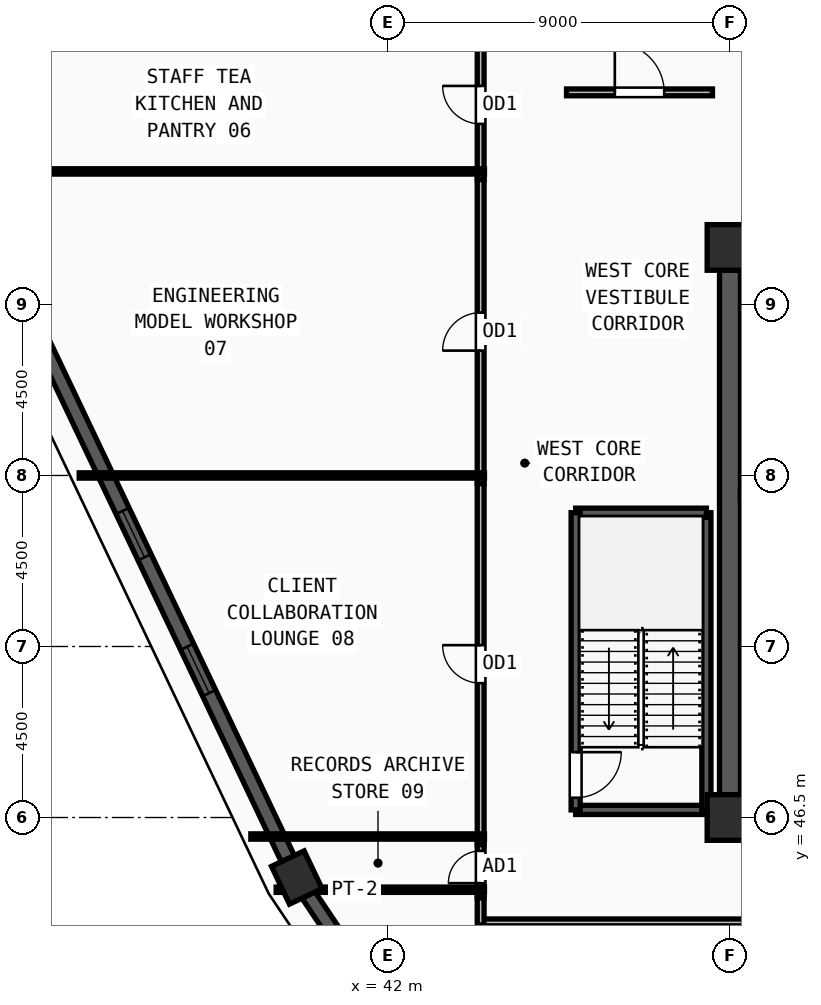
"""IFC4 building model, lengths in metres.
Left out: names, types, materials, properties, quantities, classifications, styles, units other than length and angle.
Written with IfcOpenShell. Run it as: python <this file> out.ifc"""

import sys

from ifc_helpers import new_model, si_unit, direction, frame, frame_2d, origin, origin_2d, place, context, subcontext, project, spatial, rectangle, extrude, source, transform, mapped, element, fill, save


model = new_model("IFC4")
c1 = context("Model", 3, precision=1e-05, world=origin(), true_north=direction((0.0, 1.0)))
c2 = subcontext(c1, "Body", "Model", "MODEL_VIEW")
j1 = project(units=[si_unit("LENGTHUNIT", "METRE"), si_unit("PLANEANGLEUNIT", "RADIAN")], contexts=[c1])
p1 = place(None, origin())
s1 = spatial("IfcSite", under=j1, at=p1, CompositionType="ELEMENT")
p2 = place(p1, origin())
s2 = spatial("IfcBuilding", under=s1, at=p2, CompositionType="ELEMENT")
p3 = place(p2, frame((0.0, 0.0, 297.75)))
s3 = spatial("IfcBuildingStorey", under=s2, at=p3, CompositionType="ELEMENT", Elevation=297.75)
m1 = source(origin(), c2, "Body", "SweptSolid", [
    extrude(rectangle(XDim=1.2, YDim=1.2, at=origin_2d()), origin(), (0.0, 0.0, 1.0), 3.75),
])
for number, where, z_axis, x_axis in (
    (1, (51.0, 46.5, 0.0), (0.0, 0.0, 1.0), (1.0, 0.0, 0.0)),
    (2, (51.0, 61.5, 0.0), (0.0, 0.0, 1.0), (1.0, 0.0, 0.0)),
):
    element("IfcColumn", number, at=place(p3, frame(where, z_axis=z_axis, x_axis=x_axis)), inside=s3, PredefinedType="COLUMN", context=c2, shape_type="MappedRepresentation", body=[
        mapped(m1, transform((0.0, 0.0, 0.0), x_axis=(1.0, 0.0, 0.0), y_axis=(0.0, 1.0, 0.0), z_axis=(0.0, 0.0, 1.0), scale=1.0)),
    ])
m2 = source(origin(), c2, "Body", "SweptSolid", [
    extrude(rectangle(XDim=1.1, YDim=0.95, at=origin_2d()), origin(), (0.0, 0.0, 1.0), 3.75),
])
p4 = place(p3, frame((39.602, 44.921, 0.0), z_axis=(0.0, 0.0, 1.0), x_axis=(-0.429250430767, 0.903185511225, 0.0)))
e3 = element("IfcColumn", 3, at=p4, inside=s3, PredefinedType="COLUMN", context=c2, shape_type="MappedRepresentation", body=[
    mapped(m2, transform((0.0, 0.0, 0.0), x_axis=(1.0, 0.0, 0.0), y_axis=(0.0, 1.0, 0.0), z_axis=(0.0, 0.0, 1.0), scale=1.0)),
])
p5 = place(p3, frame((29.912, 65.305, 0.0), z_axis=(0.0, 0.0, 1.0), x_axis=(0.429331226257, -0.903147107708, 0.0)))
e4 = element("IfcWall", 4, at=p5, inside=s3, PredefinedType="SOLIDWALL", context=c2, shape_type="SweptSolid", body=[
    extrude(rectangle(XDim=22.03, YDim=0.38, at=frame_2d((11.015, 0.0))), origin(), (0.0, 0.0, 1.0), 3.57),
])
m3 = source(origin(), c2, "Body", "SweptSolid", [
    extrude(rectangle(XDim=1.35, YDim=1.85, at=frame_2d((0.675, 0.925))), frame((0.0, 0.2, 0.0), z_axis=(0.0, -1.0, 0.0), x_axis=(1.0, 0.0, 0.0)), (0.0, 0.0, 1.0), 0.4),
])
p6 = place(p5, frame((4.832, 0.0, 0.55)))
e5 = element("IfcOpeningElement", 5, at=p6, cuts=e4, PredefinedType="OPENING", context=c2, shape_type="MappedRepresentation", body=[
    mapped(m3, transform((0.0, 0.0, 0.0), x_axis=(1.0, 0.0, 0.0), y_axis=(0.0, 1.0, 0.0), z_axis=(0.0, 0.0, 1.0), scale=1.0)),
])
p7 = place(p5, frame((11.89, 0.0, 0.55)))
e6 = element("IfcOpeningElement", 6, at=p7, cuts=e4, PredefinedType="OPENING", context=c2, shape_type="MappedRepresentation", body=[
    mapped(m3, transform((0.0, 0.0, 0.0), x_axis=(1.0, 0.0, 0.0), y_axis=(0.0, 1.0, 0.0), z_axis=(0.0, 0.0, 1.0), scale=1.0)),
])
p8 = place(p5, frame((15.847, 0.0, 0.55)))
e7 = element("IfcOpeningElement", 7, at=p8, cuts=e4, PredefinedType="OPENING", context=c2, shape_type="MappedRepresentation", body=[
    mapped(m3, transform((0.0, 0.0, 0.0), x_axis=(1.0, 0.0, 0.0), y_axis=(0.0, 1.0, 0.0), z_axis=(0.0, 0.0, 1.0), scale=1.0)),
])
p9 = place(p3, frame((39.903, 44.472, 0.0), z_axis=(0.0, 0.0, 1.0), x_axis=(0.556589940211, -0.830787360554, 0.0)))
e8 = element("IfcWall", 8, at=p9, inside=s3, PredefinedType="SOLIDWALL", context=c2, shape_type="SweptSolid", body=[
    extrude(rectangle(XDim=26.693, YDim=0.38, at=frame_2d((13.346, 0.0))), origin(), (0.0, 0.0, 1.0), 3.57),
])
p10 = place(p9, frame((5.998, 0.0, 0.55)))
e9 = element("IfcOpeningElement", 9, at=p10, cuts=e8, PredefinedType="OPENING", context=c2, shape_type="MappedRepresentation", body=[
    mapped(m3, transform((0.0, 0.0, 0.0), x_axis=(1.0, 0.0, 0.0), y_axis=(0.0, 1.0, 0.0), z_axis=(0.0, 0.0, 1.0), scale=1.0)),
])
p11 = place(p9, frame((12.671, 0.0, 0.55)))
e10 = element("IfcOpeningElement", 10, at=p11, cuts=e8, PredefinedType="OPENING", context=c2, shape_type="MappedRepresentation", body=[
    mapped(m3, transform((0.0, 0.0, 0.0), x_axis=(1.0, 0.0, 0.0), y_axis=(0.0, 1.0, 0.0), z_axis=(0.0, 0.0, 1.0), scale=1.0)),
])
p12 = place(p9, frame((19.345, 0.0, 0.55)))
e11 = element("IfcOpeningElement", 11, at=p12, cuts=e8, PredefinedType="OPENING", context=c2, shape_type="MappedRepresentation", body=[
    mapped(m3, transform((0.0, 0.0, 0.0), x_axis=(1.0, 0.0, 0.0), y_axis=(0.0, 1.0, 0.0), z_axis=(0.0, 0.0, 1.0), scale=1.0)),
])
p13 = place(p3, frame((51.0, 47.1, 0.0), z_axis=(0.0, 0.0, 1.0), x_axis=(0.0, 1.0, 0.0)))
e12 = element("IfcWall", 12, at=p13, inside=s3, PredefinedType="SHEAR", context=c2, shape_type="SweptSolid", body=[
    extrude(rectangle(XDim=13.8, YDim=0.55, at=frame_2d((6.9, 0.0))), origin(), (0.0, 0.0, 1.0), 3.57),
])
p14 = place(p3, frame((46.94, 46.7, 0.0), z_axis=(0.0, 0.0, 1.0), x_axis=(1.0, 0.0, 0.0)))
e13 = element("IfcWall", 13, at=p14, inside=s3, PredefinedType="SOLIDWALL", context=c2, shape_type="SweptSolid", body=[
    extrude(rectangle(XDim=3.44, YDim=0.24, at=frame_2d((1.72, 0.0))), origin(), (0.0, 0.0, 1.0), 3.57),
])
p15 = place(p3, frame((50.38, 46.7, 0.0), z_axis=(0.0, 0.0, 1.0), x_axis=(0.0, 1.0, 0.0)))
e14 = element("IfcWall", 14, at=p15, inside=s3, PredefinedType="SOLIDWALL", context=c2, shape_type="SweptSolid", body=[
    extrude(rectangle(XDim=7.82, YDim=0.24, at=frame_2d((3.91, 0.0))), origin(), (0.0, 0.0, 1.0), 3.57),
])
p16 = place(p3, frame((50.38, 54.52, 0.0), z_axis=(0.0, 0.0, 1.0), x_axis=(-1.0, 0.0, 0.0)))
e15 = element("IfcWall", 15, at=p16, inside=s3, PredefinedType="SOLIDWALL", context=c2, shape_type="SweptSolid", body=[
    extrude(rectangle(XDim=3.44, YDim=0.24, at=frame_2d((1.72, 0.0))), origin(), (0.0, 0.0, 1.0), 3.57),
])
p17 = place(p3, frame((46.94, 54.52, 0.0), z_axis=(0.0, 0.0, 1.0), x_axis=(0.0, -1.0, 0.0)))
e16 = element("IfcWall", 16, at=p17, inside=s3, PredefinedType="SOLIDWALL", context=c2, shape_type="SweptSolid", body=[
    extrude(rectangle(XDim=7.82, YDim=0.24, at=frame_2d((3.91, 0.0))), origin(), (0.0, 0.0, 1.0), 3.57),
])
m4 = source(origin(), c2, "Body", "SweptSolid", [
    extrude(rectangle(XDim=1.2, YDim=2.2, at=frame_2d((0.6, 1.1))), frame((0.0, 0.13, 0.0), z_axis=(0.0, -1.0, 0.0), x_axis=(1.0, 0.0, 0.0)), (0.0, 0.0, 1.0), 0.26),
])
p18 = place(p17, frame((6.3, 0.0, 0.0)))
e17 = element("IfcOpeningElement", 17, at=p18, cuts=e16, PredefinedType="OPENING", context=c2, shape_type="MappedRepresentation", body=[
    mapped(m4, transform((0.0, 0.0, 0.0), x_axis=(1.0, 0.0, 0.0), y_axis=(0.0, 1.0, 0.0), z_axis=(0.0, 0.0, 1.0), scale=1.0)),
])
p19 = place(p3, frame((51.275, 54.98, 0.0), z_axis=(0.0, 0.0, 1.0), x_axis=(1.0, 0.0, 0.0)))
e18 = element("IfcWall", 18, at=p19, inside=s3, PredefinedType="PARTITIONING", context=c2, shape_type="SweptSolid", body=[
    extrude(rectangle(XDim=2.485, YDim=0.18, at=frame_2d((1.243, 0.0))), origin(), (0.0, 0.0, 1.0), 3.57),
])
m5 = source(origin(), c2, "Body", "SweptSolid", [
    extrude(rectangle(XDim=0.85, YDim=2.1, at=frame_2d((0.425, 1.05))), frame((0.0, 0.1, 0.0), z_axis=(0.0, -1.0, 0.0), x_axis=(1.0, 0.0, 0.0)), (0.0, 0.0, 1.0), 0.2),
])
p20 = place(p19, frame((0.915, 0.0, 0.0)))
e19 = element("IfcOpeningElement", 19, at=p20, cuts=e18, PredefinedType="OPENING", context=c2, shape_type="MappedRepresentation", body=[
    mapped(m5, transform((0.0, 0.0, 0.0), x_axis=(1.0, 0.0, 0.0), y_axis=(0.0, 1.0, 0.0), z_axis=(0.0, 0.0, 1.0), scale=1.0)),
])
p21 = place(p3, frame((46.7, 65.58, 0.0), z_axis=(0.0, 0.0, 1.0), x_axis=(1.0, 0.0, 0.0)))
e20 = element("IfcWall", 20, at=p21, inside=s3, PredefinedType="PARTITIONING", context=c2, shape_type="SweptSolid", body=[
    extrude(rectangle(XDim=3.84, YDim=0.18, at=frame_2d((1.92, 0.0))), origin(), (0.0, 0.0, 1.0), 3.57),
])
m6 = source(origin(), c2, "Body", "SweptSolid", [
    extrude(rectangle(XDim=1.3, YDim=2.2, at=frame_2d((0.65, 1.1))), frame((0.0, 0.1, 0.0), z_axis=(0.0, -1.0, 0.0), x_axis=(1.0, 0.0, 0.0)), (0.0, 0.0, 1.0), 0.2),
])
p22 = place(p21, frame((1.27, 0.0, 0.0)))
e21 = element("IfcOpeningElement", 21, at=p22, cuts=e20, PredefinedType="OPENING", context=c2, shape_type="MappedRepresentation", body=[
    mapped(m6, transform((0.0, 0.0, 0.0), x_axis=(1.0, 0.0, 0.0), y_axis=(0.0, 1.0, 0.0), z_axis=(0.0, 0.0, 1.0), scale=1.0)),
])
p23 = place(p3, frame((44.44, 63.285, 0.0), z_axis=(0.0, 0.0, 1.0), x_axis=(0.0, 1.0, 0.0)))
e22 = element("IfcWall", 22, at=p23, inside=s3, PredefinedType="PARTITIONING", context=c2, shape_type="SweptSolid", body=[
    extrude(rectangle(XDim=3.93, YDim=0.18, at=frame_2d((1.965, 0.0))), origin(), (0.0, 0.0, 1.0), 3.57),
])
m7 = source(origin(), c2, "Body", "SweptSolid", [
    extrude(rectangle(XDim=1.0, YDim=2.2, at=frame_2d((0.5, 1.1))), frame((0.0, 0.1, 0.0), z_axis=(0.0, -1.0, 0.0), x_axis=(1.0, 0.0, 0.0)), (0.0, 0.0, 1.0), 0.2),
])
p24 = place(p23, frame((1.465, 0.0, 0.0)))
e23 = element("IfcOpeningElement", 23, at=p24, cuts=e22, PredefinedType="OPENING", context=c2, shape_type="MappedRepresentation", body=[
    mapped(m7, transform((0.0, 0.0, 0.0), x_axis=(1.0, 0.0, 0.0), y_axis=(0.0, 1.0, 0.0), z_axis=(0.0, 0.0, 1.0), scale=1.0)),
])
p25 = place(p3, frame((44.44, 55.285, 0.0), z_axis=(0.0, 0.0, 1.0), x_axis=(0.0, 1.0, 0.0)))
e24 = element("IfcWall", 24, at=p25, inside=s3, PredefinedType="PARTITIONING", context=c2, shape_type="SweptSolid", body=[
    extrude(rectangle(XDim=8.0, YDim=0.18, at=frame_2d((4.0, 0.0))), origin(), (0.0, 0.0, 1.0), 3.57),
])
p26 = place(p25, frame((3.5, 0.0, 0.0)))
e25 = element("IfcOpeningElement", 25, at=p26, cuts=e24, PredefinedType="OPENING", context=c2, shape_type="MappedRepresentation", body=[
    mapped(m7, transform((0.0, 0.0, 0.0), x_axis=(1.0, 0.0, 0.0), y_axis=(0.0, 1.0, 0.0), z_axis=(0.0, 0.0, 1.0), scale=1.0)),
])
p27 = place(p3, frame((44.44, 45.785, 0.0), z_axis=(0.0, 0.0, 1.0), x_axis=(0.0, 1.0, 0.0)))
e26 = element("IfcWall", 26, at=p27, inside=s3, PredefinedType="PARTITIONING", context=c2, shape_type="SweptSolid", body=[
    extrude(rectangle(XDim=9.5, YDim=0.18, at=frame_2d((4.75, 0.0))), origin(), (0.0, 0.0, 1.0), 3.261),
])
p28 = place(p27, frame((4.25, 0.0, 0.0)))
e27 = element("IfcOpeningElement", 27, at=p28, cuts=e26, PredefinedType="OPENING", context=c2, shape_type="MappedRepresentation", body=[
    mapped(m7, transform((0.0, 0.0, 0.0), x_axis=(1.0, 0.0, 0.0), y_axis=(0.0, 1.0, 0.0), z_axis=(0.0, 0.0, 1.0), scale=1.0)),
])
p29 = place(p3, frame((44.44, 44.385, 0.0), z_axis=(0.0, 0.0, 1.0), x_axis=(0.0, 1.0, 0.0)))
e28 = element("IfcWall", 28, at=p29, inside=s3, PredefinedType="PARTITIONING", context=c2, shape_type="SweptSolid", body=[
    extrude(rectangle(XDim=1.4, YDim=0.18, at=frame_2d((0.7, 0.0))), origin(), (0.0, 0.0, 1.0), 3.57),
])
p30 = place(p29, frame((0.387, 0.0, 0.0)))
e29 = element("IfcOpeningElement", 29, at=p30, cuts=e28, PredefinedType="OPENING", context=c2, shape_type="MappedRepresentation", body=[
    mapped(m5, transform((0.0, 0.0, 0.0), x_axis=(1.0, 0.0, 0.0), y_axis=(0.0, 1.0, 0.0), z_axis=(0.0, 0.0, 1.0), scale=1.0)),
])
p31 = place(p3, frame((75.63, 43.74, 0.0), z_axis=(0.0, 0.0, 1.0), x_axis=(-1.0, 0.0, 0.0)))
e30 = element("IfcWall", 30, at=p31, inside=s3, PredefinedType="PARTITIONING", context=c2, shape_type="SweptSolid", body=[
    extrude(rectangle(XDim=31.26, YDim=0.18, at=frame_2d((15.63, 0.0))), origin(), (0.0, 0.0, 1.0), 3.57),
])
m8 = source(origin(), c2, "Body", "SweptSolid", [
    extrude(rectangle(XDim=1.5, YDim=2.2, at=frame_2d((0.75, 1.1))), frame((0.0, 0.1, 0.0), z_axis=(0.0, -1.0, 0.0), x_axis=(1.0, 0.0, 0.0)), (0.0, 0.0, 1.0), 0.2),
])
p32 = place(p31, frame((10.68, 0.0, 0.0)))
e31 = element("IfcOpeningElement", 31, at=p32, cuts=e30, PredefinedType="OPENING", context=c2, shape_type="MappedRepresentation", body=[
    mapped(m8, transform((0.0, 0.0, 0.0), x_axis=(1.0, 0.0, 0.0), y_axis=(0.0, 1.0, 0.0), z_axis=(0.0, 0.0, 1.0), scale=1.0)),
])
p33 = place(p3, frame((44.44, 43.67, 0.0), z_axis=(0.0, 0.0, 1.0), x_axis=(0.0, 1.0, 0.0)))
e32 = element("IfcWall", 32, at=p33, inside=s3, PredefinedType="PARTITIONING", context=c2, shape_type="SweptSolid", body=[
    extrude(rectangle(XDim=0.715, YDim=0.18, at=frame_2d((0.357, 0.0))), origin(), (0.0, 0.0, 1.0), 3.57),
])
p34 = place(p3, frame((44.54, 44.6, 0.0), z_axis=(0.0, 0.0, 1.0), x_axis=(-1.0, 0.0, 0.0)))
e33 = element("IfcWall", 33, at=p34, inside=s3, PredefinedType="PARTITIONING", context=c2, shape_type="SweptSolid", body=[
    extrude(rectangle(XDim=5.481, YDim=0.14, at=frame_2d((2.74, 0.0))), origin(), (0.0, 0.0, 1.0), 3.57),
])
p35 = place(p3, frame((44.54, 46.0, 0.0), z_axis=(0.0, 0.0, 1.0), x_axis=(-1.0, 0.0, 0.0)))
e34 = element("IfcWall", 34, at=p35, inside=s3, PredefinedType="PARTITIONING", context=c2, shape_type="SweptSolid", body=[
    extrude(rectangle(XDim=6.148, YDim=0.14, at=frame_2d((3.074, 0.0))), origin(), (0.0, 0.0, 1.0), 3.57),
])
p36 = place(p3, frame((44.54, 55.5, 0.0), z_axis=(0.0, 0.0, 1.0), x_axis=(-1.0, 0.0, 0.0)))
e35 = element("IfcWall", 35, at=p36, inside=s3, PredefinedType="PARTITIONING", context=c2, shape_type="SweptSolid", body=[
    extrude(rectangle(XDim=10.664, YDim=0.14, at=frame_2d((5.332, 0.0))), origin(), (0.0, 0.0, 1.0), 3.57),
])
p37 = place(p3, frame((44.54, 63.5, 0.0), z_axis=(0.0, 0.0, 1.0), x_axis=(-1.0, 0.0, 0.0)))
e36 = element("IfcWall", 36, at=p37, inside=s3, PredefinedType="PARTITIONING", context=c2, shape_type="SweptSolid", body=[
    extrude(rectangle(XDim=14.467, YDim=0.14, at=frame_2d((7.233, 0.0))), origin(), (0.0, 0.0, 1.0), 2.967),
])
m9 = source(origin(), c2, "Body", "SweptSolid", [
    extrude(rectangle(XDim=1.35, YDim=1.85, at=frame_2d((0.675, 0.925))), frame((0.0, 0.03, 0.0), z_axis=(0.0, -1.0, 0.0), x_axis=(1.0, 0.0, 0.0)), (0.0, 0.0, 1.0), 0.06),
])
p38 = place(p7, origin())
e37 = element("IfcWindow", 37, at=p38, inside=s3, PartitioningType="SINGLE_PANEL", PredefinedType="WINDOW", context=c2, shape_type="MappedRepresentation", body=[
    mapped(m9, transform((0.0, 0.0, 0.0), x_axis=(1.0, 0.0, 0.0), y_axis=(0.0, 1.0, 0.0), z_axis=(0.0, 0.0, 1.0), scale=1.0)),
])
fill(e6, e37)
p39 = place(p8, origin())
e38 = element("IfcWindow", 38, at=p39, inside=s3, PartitioningType="SINGLE_PANEL", PredefinedType="WINDOW", context=c2, shape_type="MappedRepresentation", body=[
    mapped(m9, transform((0.0, 0.0, 0.0), x_axis=(1.0, 0.0, 0.0), y_axis=(0.0, 1.0, 0.0), z_axis=(0.0, 0.0, 1.0), scale=1.0)),
])
fill(e7, e38)
m10 = source(origin(), c2, "Body", "SweptSolid", [
    extrude(rectangle(XDim=1.2, YDim=2.2, at=frame_2d((0.6, 1.1))), frame((0.0, 0.025, 0.0), z_axis=(0.0, -1.0, 0.0), x_axis=(1.0, 0.0, 0.0)), (0.0, 0.0, 1.0), 0.05),
])
p40 = place(p18, origin())
e39 = element("IfcDoor", 39, at=p40, inside=s3, OperationType="SINGLE_SWING_LEFT", PredefinedType="DOOR", context=c2, shape_type="MappedRepresentation", body=[
    mapped(m10, transform((0.0, 0.0, 0.0), x_axis=(1.0, 0.0, 0.0), y_axis=(0.0, 1.0, 0.0), z_axis=(0.0, 0.0, 1.0), scale=1.0)),
])
fill(e17, e39)
m11 = source(origin(), c2, "Body", "SweptSolid", [
    extrude(rectangle(XDim=1.3, YDim=2.2, at=frame_2d((0.65, 1.1))), frame((0.0, 0.025, 0.0), z_axis=(0.0, -1.0, 0.0), x_axis=(1.0, 0.0, 0.0)), (0.0, 0.0, 1.0), 0.05),
])
p41 = place(p22, origin())
e40 = element("IfcDoor", 40, at=p41, inside=s3, OperationType="SINGLE_SWING_LEFT", PredefinedType="DOOR", context=c2, shape_type="MappedRepresentation", body=[
    mapped(m11, transform((0.0, 0.0, 0.0), x_axis=(1.0, 0.0, 0.0), y_axis=(0.0, 1.0, 0.0), z_axis=(0.0, 0.0, 1.0), scale=1.0)),
])
fill(e21, e40)
m12 = source(origin(), c2, "Body", "SweptSolid", [
    extrude(rectangle(XDim=1.0, YDim=2.2, at=frame_2d((0.5, 1.1))), frame((0.0, 0.025, 0.0), z_axis=(0.0, -1.0, 0.0), x_axis=(1.0, 0.0, 0.0)), (0.0, 0.0, 1.0), 0.05),
])
p42 = place(p24, origin())
e41 = element("IfcDoor", 41, at=p42, inside=s3, OperationType="SINGLE_SWING_RIGHT", PredefinedType="DOOR", context=c2, shape_type="MappedRepresentation", body=[
    mapped(m12, transform((0.0, 0.0, 0.0), x_axis=(1.0, 0.0, 0.0), y_axis=(0.0, 1.0, 0.0), z_axis=(0.0, 0.0, 1.0), scale=1.0)),
])
fill(e23, e41)
p43 = place(p26, origin())
e42 = element("IfcDoor", 42, at=p43, inside=s3, OperationType="SINGLE_SWING_LEFT", PredefinedType="DOOR", context=c2, shape_type="MappedRepresentation", body=[
    mapped(m12, transform((0.0, 0.0, 0.0), x_axis=(1.0, 0.0, 0.0), y_axis=(0.0, 1.0, 0.0), z_axis=(0.0, 0.0, 1.0), scale=1.0)),
])
fill(e25, e42)
p44 = place(p28, origin())
e43 = element("IfcDoor", 43, at=p44, inside=s3, OperationType="SINGLE_SWING_RIGHT", PredefinedType="DOOR", context=c2, shape_type="MappedRepresentation", body=[
    mapped(m12, transform((0.0, 0.0, 0.0), x_axis=(1.0, 0.0, 0.0), y_axis=(0.0, 1.0, 0.0), z_axis=(0.0, 0.0, 1.0), scale=1.0)),
])
fill(e27, e43)
m13 = source(origin(), c2, "Body", "SweptSolid", [
    extrude(rectangle(XDim=0.85, YDim=2.1, at=frame_2d((0.425, 1.05))), frame((0.0, 0.025, 0.0), z_axis=(0.0, -1.0, 0.0), x_axis=(1.0, 0.0, 0.0)), (0.0, 0.0, 1.0), 0.05),
])
p45 = place(p30, origin())
e44 = element("IfcDoor", 44, at=p45, inside=s3, OperationType="SINGLE_SWING_LEFT", PredefinedType="DOOR", context=c2, shape_type="MappedRepresentation", body=[
    mapped(m13, transform((0.0, 0.0, 0.0), x_axis=(1.0, 0.0, 0.0), y_axis=(0.0, 1.0, 0.0), z_axis=(0.0, 0.0, 1.0), scale=1.0)),
])
fill(e29, e44)
save(model, sys.argv[1])
